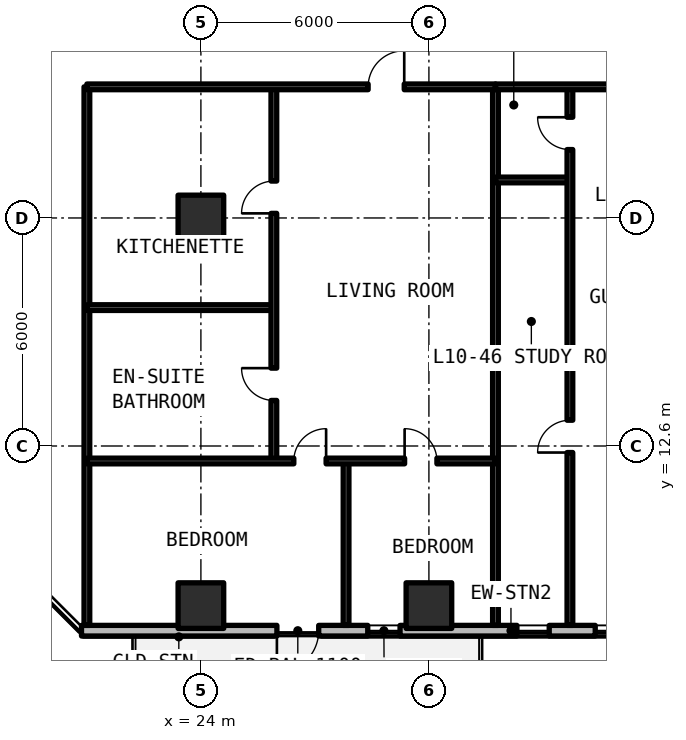
"""IFC4 building model, lengths in metres.
Left out: names, types, materials, properties, quantities, classifications, styles, units other than length and angle.
Written with IfcOpenShell. Run it as: python <this file> out.ifc"""

import sys

from ifc_helpers import new_model, si_unit, direction, frame, frame_2d, origin, origin_2d, place, context, subcontext, project, spatial, rectangle, extrude, element, fill, save


model = new_model("IFC4")
c1 = context("Model", 3, precision=1e-05, world=origin(), true_north=direction((0.0, 1.0)))
c2 = subcontext(c1, "Body", "Model", "MODEL_VIEW")
j1 = project(units=[si_unit("LENGTHUNIT", "METRE"), si_unit("PLANEANGLEUNIT", "RADIAN")], contexts=[c1])
p1 = place(None, origin())
s1 = spatial("IfcSite", under=j1, at=p1, CompositionType="ELEMENT")
p2 = place(p1, origin())
s2 = spatial("IfcBuilding", under=s1, at=p2, CompositionType="ELEMENT")
p3 = place(p2, frame((0.0, 0.0, 38.94)))
s3 = spatial("IfcBuildingStorey", under=s2, at=p3, CompositionType="ELEMENT", Elevation=38.94)
for number, where, z_axis, x_axis in (
    (1, (24.0, 18.6, 0.0), (0.0, 0.0, 1.0), (1.0, 0.0, 0.0)),
    (2, (24.0, 8.4, 0.0), (0.0, 0.0, 1.0), (1.0, 0.0, 0.0)),
    (3, (30.0, 8.4, 0.0), (0.0, 0.0, 1.0), (1.0, 0.0, 0.0)),
):
    element("IfcColumn", number, at=place(p3, frame(where, z_axis=z_axis, x_axis=x_axis)), inside=s3, PredefinedType="COLUMN", context=c2, shape_type="SweptSolid", body=[
        extrude(rectangle(XDim=1.2, YDim=1.2, at=origin_2d()), origin(), (0.0, 0.0, 1.0), 3.3),
    ])
p4 = place(p3, frame((20.858, 7.74, 0.0), z_axis=(0.0, 0.0, 1.0), x_axis=(1.0, 0.0, 0.0)))
e4 = element("IfcWall", 4, at=p4, inside=s3, PredefinedType="SOLIDWALL", context=c2, shape_type="SweptSolid", body=[
    extrude(rectangle(XDim=22.602, YDim=0.28, at=frame_2d((11.301, 0.0))), origin(), (0.0, 0.0, 1.0), 3.08),
])
p5 = place(p4, frame((5.142, 0.0, 0.0)))
e5 = element("IfcOpeningElement", 5, at=p5, cuts=e4, PredefinedType="OPENING", context=c2, shape_type="SweptSolid", body=[
    extrude(rectangle(XDim=1.1, YDim=2.15, at=frame_2d((0.55, 1.075))), frame((0.0, 0.15, 0.0), z_axis=(0.0, -1.0, 0.0), x_axis=(1.0, 0.0, 0.0)), (0.0, 0.0, 1.0), 0.3),
])
p6 = place(p4, frame((7.533, 0.0, 0.78)))
e6 = element("IfcOpeningElement", 6, at=p6, cuts=e4, PredefinedType="OPENING", context=c2, shape_type="SweptSolid", body=[
    extrude(rectangle(XDim=0.85, YDim=1.65, at=frame_2d((0.425, 0.825))), frame((0.0, 0.15, 0.0), z_axis=(0.0, -1.0, 0.0), x_axis=(1.0, 0.0, 0.0)), (0.0, 0.0, 1.0), 0.3),
])
p7 = place(p4, frame((11.458, 0.0, 0.78)))
e7 = element("IfcOpeningElement", 7, at=p7, cuts=e4, PredefinedType="OPENING", context=c2, shape_type="SweptSolid", body=[
    extrude(rectangle(XDim=0.85, YDim=1.65, at=frame_2d((0.425, 0.825))), frame((0.0, 0.15, 0.0), z_axis=(0.0, -1.0, 0.0), x_axis=(1.0, 0.0, 0.0)), (0.0, 0.0, 1.0), 0.3),
])
p8 = place(p4, frame((13.519, 0.0, 0.78)))
e8 = element("IfcOpeningElement", 8, at=p8, cuts=e4, PredefinedType="OPENING", context=c2, shape_type="SweptSolid", body=[
    extrude(rectangle(XDim=0.85, YDim=1.65, at=frame_2d((0.425, 0.825))), frame((0.0, 0.15, 0.0), z_axis=(0.0, -1.0, 0.0), x_axis=(1.0, 0.0, 0.0)), (0.0, 0.0, 1.0), 0.3),
])
p9 = place(p4, frame((17.254, 0.0, 0.78)))
e9 = element("IfcOpeningElement", 9, at=p9, cuts=e4, PredefinedType="OPENING", context=c2, shape_type="SweptSolid", body=[
    extrude(rectangle(XDim=0.85, YDim=1.65, at=frame_2d((0.425, 0.825))), frame((0.0, 0.15, 0.0), z_axis=(0.0, -1.0, 0.0), x_axis=(1.0, 0.0, 0.0)), (0.0, 0.0, 1.0), 0.3),
])
p10 = place(p4, frame((19.418, 0.0, 0.78)))
e10 = element("IfcOpeningElement", 10, at=p10, cuts=e4, PredefinedType="OPENING", context=c2, shape_type="SweptSolid", body=[
    extrude(rectangle(XDim=0.85, YDim=1.65, at=frame_2d((0.425, 0.825))), frame((0.0, 0.15, 0.0), z_axis=(0.0, -1.0, 0.0), x_axis=(1.0, 0.0, 0.0)), (0.0, 0.0, 1.0), 0.3),
])
for number, where, z_axis, x_axis in (
    (11, (21.0, 7.88, 0.0), (0.0, 0.0, 1.0), (0.0, 1.0, 0.0)),
    (12, (31.751, 7.88, 0.0), (0.0, 0.0, 1.0), (0.0, 1.0, 0.0)),
):
    element("IfcWall", number, at=place(p3, frame(where, z_axis=z_axis, x_axis=x_axis)), inside=s3, PredefinedType="SOLIDWALL", context=c2, shape_type="SweptSolid", body=[
        extrude(rectangle(XDim=14.17, YDim=0.15, at=frame_2d((7.085, 0.0))), origin(), (0.0, 0.0, 1.0), 2.35),
    ])
p11 = place(p3, frame((21.0, 16.242, 0.0), z_axis=(0.0, 0.0, 1.0), x_axis=(1.0, 0.0, 0.0)))
e13 = element("IfcWall", 13, at=p11, inside=s3, PredefinedType="PARTITIONING", context=c2, shape_type="SweptSolid", body=[
    extrude(rectangle(XDim=4.92, YDim=0.15, at=frame_2d((2.46, 0.0))), origin(), (0.0, 0.0, 1.0), 2.35),
])
p12 = place(p3, frame((25.92, 12.206, 0.0), z_axis=(0.0, 0.0, 1.0), x_axis=(0.0, 1.0, 0.0)))
e14 = element("IfcWall", 14, at=p12, inside=s3, PredefinedType="PARTITIONING", context=c2, shape_type="SweptSolid", body=[
    extrude(rectangle(XDim=9.844, YDim=0.15, at=frame_2d((4.922, 0.0))), origin(), (0.0, 0.0, 1.0), 2.35),
])
p13 = place(p12, frame((1.593, 0.0, 0.0)))
e15 = element("IfcOpeningElement", 15, at=p13, cuts=e14, PredefinedType="OPENING", context=c2, shape_type="SweptSolid", body=[
    extrude(rectangle(XDim=0.85, YDim=2.1, at=frame_2d((0.425, 1.05))), frame((0.0, 0.085, 0.0), z_axis=(0.0, -1.0, 0.0), x_axis=(1.0, 0.0, 0.0)), (0.0, 0.0, 1.0), 0.17),
])
p14 = place(p12, frame((6.515, 0.0, 0.0)))
e16 = element("IfcOpeningElement", 16, at=p14, cuts=e14, PredefinedType="OPENING", context=c2, shape_type="SweptSolid", body=[
    extrude(rectangle(XDim=0.85, YDim=2.1, at=frame_2d((0.425, 1.05))), frame((0.0, 0.085, 0.0), z_axis=(0.0, -1.0, 0.0), x_axis=(1.0, 0.0, 0.0)), (0.0, 0.0, 1.0), 0.17),
])
p15 = place(p3, frame((27.82, 7.88, 0.0), z_axis=(0.0, 0.0, 1.0), x_axis=(0.0, 1.0, 0.0)))
e17 = element("IfcWall", 17, at=p15, inside=s3, PredefinedType="PARTITIONING", context=c2, shape_type="SweptSolid", body=[
    extrude(rectangle(XDim=4.326, YDim=0.15, at=frame_2d((2.163, 0.0))), origin(), (0.0, 0.0, 1.0), 2.35),
])
p16 = place(p3, frame((21.0, 12.206, 0.0), z_axis=(0.0, 0.0, 1.0), x_axis=(1.0, 0.0, 0.0)))
e18 = element("IfcWall", 18, at=p16, inside=s3, PredefinedType="PARTITIONING", context=c2, shape_type="SweptSolid", body=[
    extrude(rectangle(XDim=10.751, YDim=0.15, at=frame_2d((5.375, 0.0))), origin(), (0.0, 0.0, 1.0), 2.35),
])
p17 = place(p16, frame((5.445, 0.0, 0.0)))
e19 = element("IfcOpeningElement", 19, at=p17, cuts=e18, PredefinedType="OPENING", context=c2, shape_type="SweptSolid", body=[
    extrude(rectangle(XDim=0.85, YDim=2.1, at=frame_2d((0.425, 1.05))), frame((0.0, 0.085, 0.0), z_axis=(0.0, -1.0, 0.0), x_axis=(1.0, 0.0, 0.0)), (0.0, 0.0, 1.0), 0.17),
])
p18 = place(p16, frame((8.361, 0.0, 0.0)))
e20 = element("IfcOpeningElement", 20, at=p18, cuts=e18, PredefinedType="OPENING", context=c2, shape_type="SweptSolid", body=[
    extrude(rectangle(XDim=0.85, YDim=2.1, at=frame_2d((0.425, 1.05))), frame((0.0, 0.085, 0.0), z_axis=(0.0, -1.0, 0.0), x_axis=(1.0, 0.0, 0.0)), (0.0, 0.0, 1.0), 0.17),
])
p19 = place(p3, frame((21.0, 22.05, 0.0), z_axis=(0.0, 0.0, 1.0), x_axis=(1.0, 0.0, 0.0)))
e21 = element("IfcWall", 21, at=p19, inside=s3, PredefinedType="SOLIDWALL", context=c2, shape_type="SweptSolid", body=[
    extrude(rectangle(XDim=10.751, YDim=0.15, at=frame_2d((5.375, 0.0))), origin(), (0.0, 0.0, 1.0), 2.35),
])
p20 = place(p19, frame((7.401, 0.0, 0.0)))
e22 = element("IfcOpeningElement", 22, at=p20, cuts=e21, PredefinedType="OPENING", context=c2, shape_type="SweptSolid", body=[
    extrude(rectangle(XDim=0.95, YDim=2.15, at=frame_2d((0.475, 1.075))), frame((0.0, 0.085, 0.0), z_axis=(0.0, -1.0, 0.0), x_axis=(1.0, 0.0, 0.0)), (0.0, 0.0, 1.0), 0.17),
])
p21 = place(p3, frame((31.751, 19.6, 0.0), z_axis=(0.0, 0.0, 1.0), x_axis=(1.0, 0.0, 0.0)))
e23 = element("IfcWall", 23, at=p21, inside=s3, PredefinedType="PARTITIONING", context=c2, shape_type="SweptSolid", body=[
    extrude(rectangle(XDim=1.959, YDim=0.15, at=frame_2d((0.979, 0.0))), origin(), (0.0, 0.0, 1.0), 2.35),
])
p22 = place(p3, frame((33.71, 7.88, 0.0), z_axis=(0.0, 0.0, 1.0), x_axis=(0.0, 1.0, 0.0)))
e24 = element("IfcWall", 24, at=p22, inside=s3, PredefinedType="PARTITIONING", context=c2, shape_type="SweptSolid", body=[
    extrude(rectangle(XDim=14.17, YDim=0.15, at=frame_2d((7.085, 0.0))), origin(), (0.0, 0.0, 1.0), 2.35),
])
p23 = place(p22, frame((4.548, 0.0, 0.0)))
e25 = element("IfcOpeningElement", 25, at=p23, cuts=e24, PredefinedType="OPENING", context=c2, shape_type="SweptSolid", body=[
    extrude(rectangle(XDim=0.85, YDim=2.1, at=frame_2d((0.425, 1.05))), frame((0.0, 0.085, 0.0), z_axis=(0.0, -1.0, 0.0), x_axis=(1.0, 0.0, 0.0)), (0.0, 0.0, 1.0), 0.17),
])
p24 = place(p22, frame((12.52, 0.0, 0.0)))
e26 = element("IfcOpeningElement", 26, at=p24, cuts=e24, PredefinedType="OPENING", context=c2, shape_type="SweptSolid", body=[
    extrude(rectangle(XDim=0.85, YDim=2.1, at=frame_2d((0.425, 1.05))), frame((0.0, 0.085, 0.0), z_axis=(0.0, -1.0, 0.0), x_axis=(1.0, 0.0, 0.0)), (0.0, 0.0, 1.0), 0.17),
])
p25 = place(p3, frame((31.751, 22.05, 0.0), z_axis=(0.0, 0.0, 1.0), x_axis=(1.0, 0.0, 0.0)))
e27 = element("IfcWall", 27, at=p25, inside=s3, PredefinedType="SOLIDWALL", context=c2, shape_type="SweptSolid", body=[
    extrude(rectangle(XDim=5.761, YDim=0.15, at=frame_2d((2.881, 0.0))), origin(), (0.0, 0.0, 1.0), 2.35),
])
p26 = place(p25, frame((3.425, 0.0, 0.0)))
e28 = element("IfcOpeningElement", 28, at=p26, cuts=e27, PredefinedType="OPENING", context=c2, shape_type="SweptSolid", body=[
    extrude(rectangle(XDim=0.95, YDim=2.15, at=frame_2d((0.475, 1.075))), frame((0.0, 0.085, 0.0), z_axis=(0.0, -1.0, 0.0), x_axis=(1.0, 0.0, 0.0)), (0.0, 0.0, 1.0), 0.17),
])
p27 = place(p5, frame((1.1, 0.0, 0.0), z_axis=(0.0, 0.0, 1.0), x_axis=(-1.0, 0.0, 0.0)))
e29 = element("IfcDoor", 29, at=p27, inside=s3, OperationType="SINGLE_SWING_RIGHT", PredefinedType="DOOR", context=c2, shape_type="SweptSolid", body=[
    extrude(rectangle(XDim=1.1, YDim=2.15, at=frame_2d((0.55, 1.075))), frame((0.0, 0.025, 0.0), z_axis=(0.0, -1.0, 0.0), x_axis=(1.0, 0.0, 0.0)), (0.0, 0.0, 1.0), 0.05),
])
fill(e5, e29)
p28 = place(p6, origin())
e30 = element("IfcWindow", 30, at=p28, inside=s3, PartitioningType="SINGLE_PANEL", PredefinedType="WINDOW", context=c2, shape_type="SweptSolid", body=[
    extrude(rectangle(XDim=0.85, YDim=1.65, at=frame_2d((0.425, 0.825))), frame((0.0, 0.03, 0.0), z_axis=(0.0, -1.0, 0.0), x_axis=(1.0, 0.0, 0.0)), (0.0, 0.0, 1.0), 0.06),
])
fill(e6, e30)
p29 = place(p7, origin())
e31 = element("IfcWindow", 31, at=p29, inside=s3, PartitioningType="SINGLE_PANEL", PredefinedType="WINDOW", context=c2, shape_type="SweptSolid", body=[
    extrude(rectangle(XDim=0.85, YDim=1.65, at=frame_2d((0.425, 0.825))), frame((0.0, 0.03, 0.0), z_axis=(0.0, -1.0, 0.0), x_axis=(1.0, 0.0, 0.0)), (0.0, 0.0, 1.0), 0.06),
])
fill(e7, e31)
p30 = place(p8, origin())
e32 = element("IfcWindow", 32, at=p30, inside=s3, PartitioningType="SINGLE_PANEL", PredefinedType="WINDOW", context=c2, shape_type="SweptSolid", body=[
    extrude(rectangle(XDim=0.85, YDim=1.65, at=frame_2d((0.425, 0.825))), frame((0.0, 0.03, 0.0), z_axis=(0.0, -1.0, 0.0), x_axis=(1.0, 0.0, 0.0)), (0.0, 0.0, 1.0), 0.06),
])
fill(e8, e32)
p31 = place(p13, origin())
e33 = element("IfcDoor", 33, at=p31, inside=s3, OperationType="SINGLE_SWING_RIGHT", PredefinedType="DOOR", context=c2, shape_type="SweptSolid", body=[
    extrude(rectangle(XDim=0.85, YDim=2.1, at=frame_2d((0.425, 1.05))), frame((0.0, 0.025, 0.0), z_axis=(0.0, -1.0, 0.0), x_axis=(1.0, 0.0, 0.0)), (0.0, 0.0, 1.0), 0.05),
])
fill(e15, e33)
p32 = place(p14, origin())
e34 = element("IfcDoor", 34, at=p32, inside=s3, OperationType="SINGLE_SWING_LEFT", PredefinedType="DOOR", context=c2, shape_type="SweptSolid", body=[
    extrude(rectangle(XDim=0.85, YDim=2.1, at=frame_2d((0.425, 1.05))), frame((0.0, 0.025, 0.0), z_axis=(0.0, -1.0, 0.0), x_axis=(1.0, 0.0, 0.0)), (0.0, 0.0, 1.0), 0.05),
])
fill(e16, e34)
p33 = place(p17, origin())
e35 = element("IfcDoor", 35, at=p33, inside=s3, OperationType="SINGLE_SWING_RIGHT", PredefinedType="DOOR", context=c2, shape_type="SweptSolid", body=[
    extrude(rectangle(XDim=0.85, YDim=2.1, at=frame_2d((0.425, 1.05))), frame((0.0, 0.025, 0.0), z_axis=(0.0, -1.0, 0.0), x_axis=(1.0, 0.0, 0.0)), (0.0, 0.0, 1.0), 0.05),
])
fill(e19, e35)
p34 = place(p18, origin())
e36 = element("IfcDoor", 36, at=p34, inside=s3, OperationType="SINGLE_SWING_LEFT", PredefinedType="DOOR", context=c2, shape_type="SweptSolid", body=[
    extrude(rectangle(XDim=0.85, YDim=2.1, at=frame_2d((0.425, 1.05))), frame((0.0, 0.025, 0.0), z_axis=(0.0, -1.0, 0.0), x_axis=(1.0, 0.0, 0.0)), (0.0, 0.0, 1.0), 0.05),
])
fill(e20, e36)
p35 = place(p20, origin())
e37 = element("IfcDoor", 37, at=p35, inside=s3, OperationType="SINGLE_SWING_RIGHT", PredefinedType="DOOR", context=c2, shape_type="SweptSolid", body=[
    extrude(rectangle(XDim=0.95, YDim=2.15, at=frame_2d((0.475, 1.075))), frame((0.0, 0.025, 0.0), z_axis=(0.0, -1.0, 0.0), x_axis=(1.0, 0.0, 0.0)), (0.0, 0.0, 1.0), 0.05),
])
fill(e22, e37)
p36 = place(p23, origin())
e38 = element("IfcDoor", 38, at=p36, inside=s3, OperationType="SINGLE_SWING_LEFT", PredefinedType="DOOR", context=c2, shape_type="SweptSolid", body=[
    extrude(rectangle(XDim=0.85, YDim=2.1, at=frame_2d((0.425, 1.05))), frame((0.0, 0.025, 0.0), z_axis=(0.0, -1.0, 0.0), x_axis=(1.0, 0.0, 0.0)), (0.0, 0.0, 1.0), 0.05),
])
fill(e25, e38)
p37 = place(p24, origin())
e39 = element("IfcDoor", 39, at=p37, inside=s3, OperationType="SINGLE_SWING_RIGHT", PredefinedType="DOOR", context=c2, shape_type="SweptSolid", body=[
    extrude(rectangle(XDim=0.85, YDim=2.1, at=frame_2d((0.425, 1.05))), frame((0.0, 0.025, 0.0), z_axis=(0.0, -1.0, 0.0), x_axis=(1.0, 0.0, 0.0)), (0.0, 0.0, 1.0), 0.05),
])
fill(e26, e39)
save(model, sys.argv[1])
